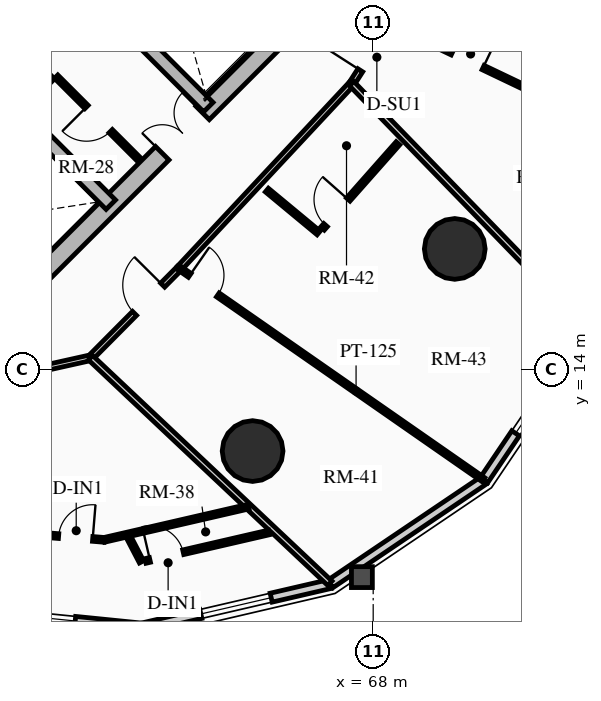
"""IFC4 building model, lengths in metres.
Left out: names, types, materials, properties, quantities, classifications, styles, units other than length and angle.
Written with IfcOpenShell. Run it as: python <this file> out.ifc"""

import sys

from ifc_helpers import new_model, si_unit, direction, frame, frame_2d, origin, origin_2d, place, context, subcontext, project, spatial, rectangle, circle, extrude, source, transform, mapped, element, fill, save


model = new_model("IFC4")
c1 = context("Model", 3, precision=1e-05, world=origin(), true_north=direction((0.0, 1.0)))
c2 = subcontext(c1, "Body", "Model", "MODEL_VIEW")
j1 = project(units=[si_unit("LENGTHUNIT", "METRE"), si_unit("PLANEANGLEUNIT", "RADIAN")], contexts=[c1])
p1 = place(None, origin())
s1 = spatial("IfcSite", under=j1, at=p1, CompositionType="ELEMENT")
p2 = place(p1, origin())
s2 = spatial("IfcBuilding", under=s1, at=p2, CompositionType="ELEMENT")
p3 = place(p2, frame((0.0, 0.0, 45.28)))
s3 = spatial("IfcBuildingStorey", under=s2, at=p3, CompositionType="ELEMENT", Elevation=45.28)
p4 = place(p3, frame((58.596, 15.838, 0.0), z_axis=(0.0, 0.0, 1.0), x_axis=(0.707106781187, 0.707106781187, 0.0)))
e1 = element("IfcWall", 1, at=p4, inside=s3, PredefinedType="SHEAR", context=c2, shape_type="SweptSolid", body=[
    extrude(rectangle(XDim=10.7, YDim=0.5, at=frame_2d((5.35, 0.0))), origin(), (0.0, 0.0, 1.0), 2.91),
])
m1 = source(origin(), c2, "Body", "SweptSolid", [
    extrude(rectangle(XDim=1.5, YDim=2.02, at=frame_2d((0.75, 1.01))), frame((0.0, 0.26, 0.0), z_axis=(0.0, -1.0, 0.0), x_axis=(1.0, 0.0, 0.0)), (0.0, 0.0, 1.0), 0.52),
])
p5 = place(p4, frame((5.45, 0.0, 0.0)))
e2 = element("IfcOpeningElement", 2, at=p5, cuts=e1, PredefinedType="OPENING", context=c2, shape_type="MappedRepresentation", body=[
    mapped(m1, transform((0.0, 0.0, 0.0), x_axis=(1.0, 0.0, 0.0), y_axis=(0.0, 1.0, 0.0), z_axis=(0.0, 0.0, 1.0), scale=1.0)),
])
p6 = place(p3, frame((61.096, 18.338, 0.0), z_axis=(0.0, 0.0, 1.0), x_axis=(-0.707106781187, 0.707106781187, 0.0)))
e3 = element("IfcWall", 3, at=p6, inside=s3, PredefinedType="SHEAR", context=c2, shape_type="SweptSolid", body=[
    extrude(rectangle(XDim=13.8, YDim=0.35, at=frame_2d((6.9, 0.0))), origin(), (0.0, 0.0, 1.0), 2.91),
])
m2 = source(origin(), c2, "Body", "SweptSolid", [
    extrude(rectangle(XDim=1.1, YDim=2.015, at=frame_2d((0.55, 1.007))), frame((0.0, 0.185, 0.0), z_axis=(0.0, -1.0, 0.0), x_axis=(1.0, 0.0, 0.0)), (0.0, 0.0, 1.0), 0.37),
])
p7 = place(p6, frame((4.9, 0.0, 0.0)))
e4 = element("IfcOpeningElement", 4, at=p7, cuts=e3, PredefinedType="OPENING", context=c2, shape_type="MappedRepresentation", body=[
    mapped(m2, transform((0.0, 0.0, 0.0), x_axis=(1.0, 0.0, 0.0), y_axis=(0.0, 1.0, 0.0), z_axis=(0.0, 0.0, 1.0), scale=1.0)),
])
m3 = source(origin(), c2, "Body", "SweptSolid", [
    extrude(rectangle(XDim=1.15, YDim=2.02, at=frame_2d((0.575, 1.01))), frame((0.0, 0.185, 0.0), z_axis=(0.0, -1.0, 0.0), x_axis=(1.0, 0.0, 0.0)), (0.0, 0.0, 1.0), 0.37),
])
p8 = place(p6, frame((7.32, 0.0, 0.0)))
e5 = element("IfcOpeningElement", 5, at=p8, cuts=e3, PredefinedType="OPENING", context=c2, shape_type="MappedRepresentation", body=[
    mapped(m3, transform((0.0, 0.0, 0.0), x_axis=(1.0, 0.0, 0.0), y_axis=(0.0, 1.0, 0.0), z_axis=(0.0, 0.0, 1.0), scale=1.0)),
])
p9 = place(p3, frame((63.662, 20.904, 0.0), z_axis=(0.0, 0.0, 1.0), x_axis=(-0.707106781187, 0.707106781187, 0.0)))
e6 = element("IfcWall", 6, at=p9, inside=s3, PredefinedType="SHEAR", context=c2, shape_type="SweptSolid", body=[
    extrude(rectangle(XDim=13.8, YDim=0.35, at=frame_2d((6.9, 0.0))), origin(), (0.0, 0.0, 1.0), 2.91),
])
p10 = place(p9, frame((10.025, 0.0, 0.0)))
e7 = element("IfcOpeningElement", 7, at=p10, cuts=e6, PredefinedType="OPENING", context=c2, shape_type="MappedRepresentation", body=[
    mapped(m2, transform((0.0, 0.0, 0.0), x_axis=(1.0, 0.0, 0.0), y_axis=(0.0, 1.0, 0.0), z_axis=(0.0, 0.0, 1.0), scale=1.0)),
])
p11 = place(p9, frame((12.025, 0.0, 0.0)))
e8 = element("IfcOpeningElement", 8, at=p11, cuts=e6, PredefinedType="OPENING", context=c2, shape_type="MappedRepresentation", body=[
    mapped(m2, transform((0.0, 0.0, 0.0), x_axis=(1.0, 0.0, 0.0), y_axis=(0.0, 1.0, 0.0), z_axis=(0.0, 0.0, 1.0), scale=1.0)),
])
p12 = place(p9, frame((5.33, 0.0, 0.0)))
e9 = element("IfcOpeningElement", 9, at=p12, cuts=e6, PredefinedType="OPENING", context=c2, shape_type="MappedRepresentation", body=[
    mapped(m3, transform((0.0, 0.0, 0.0), x_axis=(1.0, 0.0, 0.0), y_axis=(0.0, 1.0, 0.0), z_axis=(0.0, 0.0, 1.0), scale=1.0)),
])
for number, where, z_axis, x_axis in (
    (10, (64.827, 11.854, 0.0), (0.0, 0.0, 1.0), (1.0, 0.0, 0.0)),
    (11, (70.146, 17.173, 0.0), (0.0, 0.0, 1.0), (1.0, 0.0, 0.0)),
):
    element("IfcColumn", number, at=place(p3, frame(where, z_axis=z_axis, x_axis=x_axis)), inside=s3, PredefinedType="USERDEFINED", context=c2, shape_type="SweptSolid", body=[
        extrude(circle(Radius=0.8, at=origin_2d()), origin(), (0.0, 0.0, 1.0), 2.91),
    ])
p13 = place(p3, frame((61.91, 7.206, 0.0), z_axis=(0.0, 0.0, 1.0), x_axis=(-0.994968263437, 0.100190592135, 0.0)))
e12 = element("IfcWall", 12, at=p13, inside=s3, PredefinedType="SOLIDWALL", context=c2, shape_type="SweptSolid", body=[
    extrude(rectangle(XDim=5.419, YDim=0.24, at=frame_2d((2.71, 0.0))), origin(), (0.0, 0.0, 1.0), 2.073),
])
m4 = source(origin(), c2, "Body", "SweptSolid", [
    extrude(rectangle(XDim=1.9, YDim=1.35, at=frame_2d((0.95, 0.675))), frame((0.0, 0.13, 0.0), z_axis=(0.0, -1.0, 0.0), x_axis=(1.0, 0.0, 0.0)), (0.0, 0.0, 1.0), 0.26),
])
p14 = place(p13, frame((1.76, 0.0, 0.65)))
e13 = element("IfcOpeningElement", 13, at=p14, cuts=e12, PredefinedType="OPENING", context=c2, shape_type="MappedRepresentation", body=[
    mapped(m4, transform((0.0, 0.0, 0.0), x_axis=(1.0, 0.0, 0.0), y_axis=(0.0, 1.0, 0.0), z_axis=(0.0, 0.0, 1.0), scale=1.0)),
])
p15 = place(p3, frame((66.871, 8.356, 0.0), z_axis=(0.0, 0.0, 1.0), x_axis=(-0.974167686491, -0.22582585901, 0.0)))
e14 = element("IfcWall", 14, at=p15, inside=s3, PredefinedType="SOLIDWALL", context=c2, shape_type="SweptSolid", body=[
    extrude(rectangle(XDim=5.092, YDim=0.24, at=frame_2d((2.546, 0.0))), origin(), (0.0, 0.0, 1.0), 2.073),
])
p16 = place(p15, frame((1.596, 0.0, 0.65)))
e15 = element("IfcOpeningElement", 15, at=p16, cuts=e14, PredefinedType="OPENING", context=c2, shape_type="MappedRepresentation", body=[
    mapped(m4, transform((0.0, 0.0, 0.0), x_axis=(1.0, 0.0, 0.0), y_axis=(0.0, 1.0, 0.0), z_axis=(0.0, 0.0, 1.0), scale=1.0)),
])
p17 = place(p3, frame((70.914, 11.086, 0.0), z_axis=(0.0, 0.0, 1.0), x_axis=(-0.828748297084, -0.559621532896, 0.0)))
e16 = element("IfcWall", 16, at=p17, inside=s3, PredefinedType="SOLIDWALL", context=c2, shape_type="SweptSolid", body=[
    extrude(rectangle(XDim=4.879, YDim=0.24, at=frame_2d((2.439, 0.0))), origin(), (0.0, 0.0, 1.0), 2.073),
])
p18 = place(p3, frame((73.644, 15.129, 0.0), z_axis=(0.0, 0.0, 1.0), x_axis=(-0.559621532896, -0.828748297084, 0.0)))
e17 = element("IfcWall", 17, at=p18, inside=s3, PredefinedType="SOLIDWALL", context=c2, shape_type="SweptSolid", body=[
    extrude(rectangle(XDim=4.879, YDim=0.24, at=frame_2d((2.439, 0.0))), origin(), (0.0, 0.0, 1.0), 2.073),
])
p19 = place(p18, frame((1.489, 0.0, 0.65)))
e18 = element("IfcOpeningElement", 18, at=p19, cuts=e17, PredefinedType="OPENING", context=c2, shape_type="MappedRepresentation", body=[
    mapped(m4, transform((0.0, 0.0, 0.0), x_axis=(1.0, 0.0, 0.0), y_axis=(0.0, 1.0, 0.0), z_axis=(0.0, 0.0, 1.0), scale=1.0)),
])
p20 = place(p3, frame((58.214, 21.467, 0.0), z_axis=(0.0, 0.0, 1.0), x_axis=(0.707106781187, 0.707106781187, 0.0)))
e19 = element("IfcWall", 19, at=p20, inside=s3, PredefinedType="PARTITIONING", context=c2, shape_type="SweptSolid", body=[
    extrude(rectangle(XDim=3.28, YDim=0.2, at=frame_2d((1.64, 0.0))), origin(), (0.0, 0.0, 1.0), 2.635),
])
m5 = source(origin(), c2, "Body", "SweptSolid", [
    extrude(rectangle(XDim=1.5, YDim=2.02, at=frame_2d((0.75, 1.01))), frame((0.0, 0.11, 0.0), z_axis=(0.0, -1.0, 0.0), x_axis=(1.0, 0.0, 0.0)), (0.0, 0.0, 1.0), 0.22),
])
p21 = place(p20, frame((1.55, 0.0, 0.0)))
e20 = element("IfcOpeningElement", 20, at=p21, cuts=e19, PredefinedType="OPENING", context=c2, shape_type="MappedRepresentation", body=[
    mapped(m5, transform((0.0, 0.0, 0.0), x_axis=(1.0, 0.0, 0.0), y_axis=(0.0, 1.0, 0.0), z_axis=(0.0, 0.0, 1.0), scale=1.0)),
])
p22 = place(p3, frame((61.835, 19.529, 0.0), z_axis=(0.0, 0.0, 1.0), x_axis=(-0.707146413884, 0.707067146267, 0.0)))
e21 = element("IfcWall", 21, at=p22, inside=s3, PredefinedType="PARTITIONING", context=c2, shape_type="SweptSolid", body=[
    extrude(rectangle(XDim=3.08, YDim=0.125, at=frame_2d((1.54, 0.0))), origin(), (0.0, 0.0, 1.0), 2.635),
])
m6 = source(origin(), c2, "Body", "SweptSolid", [
    extrude(rectangle(XDim=0.9, YDim=2.005, at=frame_2d((0.45, 1.002))), frame((0.0, 0.073, 0.0), z_axis=(0.0, -1.0, 0.0), x_axis=(1.0, 0.0, 0.0)), (0.0, 0.0, 1.0), 0.145),
])
p23 = place(p22, frame((1.05, 0.0, 0.0)))
e22 = element("IfcOpeningElement", 22, at=p23, cuts=e21, PredefinedType="OPENING", context=c2, shape_type="MappedRepresentation", body=[
    mapped(m6, transform((0.0, 0.0, 0.0), x_axis=(1.0, 0.0, 0.0), y_axis=(0.0, 1.0, 0.0), z_axis=(0.0, 0.0, 1.0), scale=1.0)),
])
p24 = place(p3, frame((58.794, 20.915, 0.0), z_axis=(0.0, 0.0, 1.0), x_axis=(0.707106781187, 0.707106781187, 0.0)))
e23 = element("IfcWall", 23, at=p24, inside=s3, PredefinedType="PARTITIONING", context=c2, shape_type="SweptSolid", body=[
    extrude(rectangle(XDim=1.1, YDim=0.125, at=frame_2d((0.55, 0.0))), origin(), (0.0, 0.0, 1.0), 2.635),
])
p25 = place(p3, frame((59.008, 13.963, 0.0), z_axis=(0.0, 0.0, 1.0), x_axis=(0.976020856791, 0.21767702476, 0.0)))
e24 = element("IfcWall", 24, at=p25, inside=s3, PredefinedType="PARTITIONING", context=c2, shape_type="SweptSolid", body=[
    extrude(rectangle(XDim=1.593, YDim=0.15, at=frame_2d((0.796, 0.0))), origin(), (0.0, 0.0, 1.0), 2.205),
])
p26 = place(p3, frame((60.562, 14.31, 0.0), z_axis=(0.0, 0.0, 1.0), x_axis=(0.704566236161, 0.709638230975, 0.0)))
e25 = element("IfcWall", 25, at=p26, inside=s3, PredefinedType="PARTITIONING", context=c2, shape_type="SweptSolid", body=[
    extrude(rectangle(XDim=3.321, YDim=0.15, at=frame_2d((1.661, 0.0))), origin(), (0.0, 0.0, 1.0), 2.159),
])
m7 = source(origin(), c2, "Body", "SweptSolid", [
    extrude(rectangle(XDim=1.05, YDim=2.015, at=frame_2d((0.525, 1.007))), frame((0.0, 0.085, 0.0), z_axis=(0.0, -1.0, 0.0), x_axis=(1.0, 0.0, 0.0)), (0.0, 0.0, 1.0), 0.17),
])
p27 = place(p26, frame((1.643, 0.0, 0.0)))
e26 = element("IfcOpeningElement", 26, at=p27, cuts=e25, PredefinedType="OPENING", context=c2, shape_type="MappedRepresentation", body=[
    mapped(m7, transform((0.0, 0.0, 0.0), x_axis=(1.0, 0.0, 0.0), y_axis=(0.0, 1.0, 0.0), z_axis=(0.0, 0.0, 1.0), scale=1.0)),
])
p28 = place(p3, frame((62.903, 16.667, 0.0), z_axis=(0.0, 0.0, 1.0), x_axis=(0.682371947497, 0.731005147225, 0.0)))
e27 = element("IfcWall", 27, at=p28, inside=s3, PredefinedType="PARTITIONING", context=c2, shape_type="SweptSolid", body=[
    extrude(rectangle(XDim=6.642, YDim=0.15, at=frame_2d((3.321, 0.0))), origin(), (0.0, 0.0, 1.0), 2.159),
])
p29 = place(p3, frame((67.435, 21.521, 0.0), z_axis=(0.0, 0.0, 1.0), x_axis=(0.540777197838, 0.841165870859, 0.0)))
e28 = element("IfcWall", 28, at=p29, inside=s3, PredefinedType="PARTITIONING", context=c2, shape_type="SweptSolid", body=[
    extrude(rectangle(XDim=1.888, YDim=0.15, at=frame_2d((0.944, 0.0))), origin(), (0.0, 0.0, 1.0), 2.205),
])
p30 = place(p29, frame((0.419, 0.0, 0.0)))
e29 = element("IfcOpeningElement", 29, at=p30, cuts=e28, PredefinedType="OPENING", context=c2, shape_type="MappedRepresentation", body=[
    mapped(m7, transform((0.0, 0.0, 0.0), x_axis=(1.0, 0.0, 0.0), y_axis=(0.0, 1.0, 0.0), z_axis=(0.0, 0.0, 1.0), scale=1.0)),
])
p31 = place(p3, frame((60.562, 14.31, 0.0), z_axis=(0.0, 0.0, 1.0), x_axis=(0.727781661561, -0.685808904211, 0.0)))
e30 = element("IfcWall", 30, at=p31, inside=s3, PredefinedType="PARTITIONING", context=c2, shape_type="SweptSolid", body=[
    extrude(rectangle(XDim=8.655, YDim=0.16, at=frame_2d((4.328, 0.0))), origin(), (0.0, 0.0, 1.0), 2.073),
])
p32 = place(p3, frame((67.435, 21.521, 0.0), z_axis=(0.0, 0.0, 1.0), x_axis=(0.6962628802, -0.717786877601, 0.0)))
e31 = element("IfcWall", 31, at=p32, inside=s3, PredefinedType="PARTITIONING", context=c2, shape_type="SweptSolid", body=[
    extrude(rectangle(XDim=8.893, YDim=0.16, at=frame_2d((4.446, 0.0))), origin(), (0.0, 0.0, 1.0), 2.073),
])
p33 = place(p3, frame((56.858, 9.852, 0.0), z_axis=(0.0, 0.0, 1.0), x_axis=(0.996604967548, -0.082331881181, 0.0)))
e32 = element("IfcWall", 32, at=p33, inside=s3, PredefinedType="PARTITIONING", context=c2, shape_type="SweptSolid", body=[
    extrude(rectangle(XDim=4.077, YDim=0.125, at=frame_2d((2.039, 0.0))), origin(), (0.0, 0.0, 1.0), 2.205),
])
p34 = place(p33, frame((2.874, 0.0, 0.0)))
e33 = element("IfcOpeningElement", 33, at=p34, cuts=e32, PredefinedType="OPENING", context=c2, shape_type="MappedRepresentation", body=[
    mapped(m6, transform((0.0, 0.0, 0.0), x_axis=(1.0, 0.0, 0.0), y_axis=(0.0, 1.0, 0.0), z_axis=(0.0, 0.0, 1.0), scale=1.0)),
])
p35 = place(p3, frame((60.921, 9.517, 0.0), z_axis=(0.0, 0.0, 1.0), x_axis=(0.974453436038, 0.224589627973, 0.0)))
e34 = element("IfcWall", 34, at=p35, inside=s3, PredefinedType="PARTITIONING", context=c2, shape_type="SweptSolid", body=[
    extrude(rectangle(XDim=3.898, YDim=0.125, at=frame_2d((1.949, 0.0))), origin(), (0.0, 0.0, 1.0), 2.205),
])
p36 = place(p3, frame((61.564, 9.589, 0.0), z_axis=(0.0, 0.0, 1.0), x_axis=(0.462168536246, -0.886792108729, 0.0)))
e35 = element("IfcWall", 35, at=p36, inside=s3, PredefinedType="PARTITIONING", context=c2, shape_type="SweptSolid", body=[
    extrude(rectangle(XDim=0.735, YDim=0.125, at=frame_2d((0.367, 0.0))), origin(), (0.0, 0.0, 1.0), 2.635),
])
p37 = place(p3, frame((62.008, 8.962, 0.0), z_axis=(0.0, 0.0, 1.0), x_axis=(0.974365294983, 0.224971713626, 0.0)))
e36 = element("IfcWall", 36, at=p37, inside=s3, PredefinedType="PARTITIONING", context=c2, shape_type="SweptSolid", body=[
    extrude(rectangle(XDim=3.337, YDim=0.125, at=frame_2d((1.668, 0.0))), origin(), (0.0, 0.0, 1.0), 2.635),
])
p38 = place(p37, frame((0.12, 0.0, 0.0)))
e37 = element("IfcOpeningElement", 37, at=p38, cuts=e36, PredefinedType="OPENING", context=c2, shape_type="MappedRepresentation", body=[
    mapped(m6, transform((0.0, 0.0, 0.0), x_axis=(1.0, 0.0, 0.0), y_axis=(0.0, 1.0, 0.0), z_axis=(0.0, 0.0, 1.0), scale=1.0)),
])
p39 = place(p3, frame((62.903, 16.667, 0.0), z_axis=(0.0, 0.0, 1.0), x_axis=(0.820761665638, -0.571270766116, 0.0)))
e38 = element("IfcWall", 38, at=p39, inside=s3, PredefinedType="PARTITIONING", context=c2, shape_type="SweptSolid", body=[
    extrude(rectangle(XDim=9.743, YDim=0.125, at=frame_2d((4.872, 0.0))), origin(), (0.0, 0.0, 1.0), 2.073),
])
p40 = place(p39, frame((0.33, 0.0, 0.0)))
e39 = element("IfcOpeningElement", 39, at=p40, cuts=e38, PredefinedType="OPENING", context=c2, shape_type="MappedRepresentation", body=[
    mapped(m6, transform((0.0, 0.0, 0.0), x_axis=(1.0, 0.0, 0.0), y_axis=(0.0, 1.0, 0.0), z_axis=(0.0, 0.0, 1.0), scale=1.0)),
])
p41 = place(p3, frame((65.202, 18.721, 0.0), z_axis=(0.0, 0.0, 1.0), x_axis=(0.769814202386, -0.638268042287, 0.0)))
e40 = element("IfcWall", 40, at=p41, inside=s3, PredefinedType="PARTITIONING", context=c2, shape_type="SweptSolid", body=[
    extrude(rectangle(XDim=1.769, YDim=0.125, at=frame_2d((0.884, 0.0))), origin(), (0.0, 0.0, 1.0), 2.635),
])
p42 = place(p3, frame((66.667, 17.709, 0.0), z_axis=(0.0, 0.0, 1.0), x_axis=(0.662510581678, 0.749052554341, 0.0)))
e41 = element("IfcWall", 41, at=p42, inside=s3, PredefinedType="PARTITIONING", context=c2, shape_type="SweptSolid", body=[
    extrude(rectangle(XDim=2.996, YDim=0.125, at=frame_2d((1.498, 0.0))), origin(), (0.0, 0.0, 1.0), 2.159),
])
p43 = place(p42, frame((0.12, 0.0, 0.0)))
e42 = element("IfcOpeningElement", 42, at=p43, cuts=e41, PredefinedType="OPENING", context=c2, shape_type="MappedRepresentation", body=[
    mapped(m6, transform((0.0, 0.0, 0.0), x_axis=(1.0, 0.0, 0.0), y_axis=(0.0, 1.0, 0.0), z_axis=(0.0, 0.0, 1.0), scale=1.0)),
])
p44 = place(p3, frame((68.456, 23.11, 0.0), z_axis=(0.0, 0.0, 1.0), x_axis=(0.902430819297, -0.430834790125, 0.0)))
e43 = element("IfcWall", 43, at=p44, inside=s3, PredefinedType="PARTITIONING", context=c2, shape_type="SweptSolid", body=[
    extrude(rectangle(XDim=7.002, YDim=0.125, at=frame_2d((3.501, 0.0))), origin(), (0.0, 0.0, 1.0), 2.073),
])
p45 = place(p44, frame((1.8, 0.0, 0.0)))
e44 = element("IfcOpeningElement", 44, at=p45, cuts=e43, PredefinedType="OPENING", context=c2, shape_type="MappedRepresentation", body=[
    mapped(m6, transform((0.0, 0.0, 0.0), x_axis=(1.0, 0.0, 0.0), y_axis=(0.0, 1.0, 0.0), z_axis=(0.0, 0.0, 1.0), scale=1.0)),
])
m8 = source(origin(), c2, "Body", "SweptSolid", [
    extrude(rectangle(XDim=1.9, YDim=1.35, at=frame_2d((0.95, 0.675))), frame((0.0, 0.03, 0.0), z_axis=(0.0, -1.0, 0.0), x_axis=(1.0, 0.0, 0.0)), (0.0, 0.0, 1.0), 0.06),
])
p46 = place(p14, origin())
e45 = element("IfcWindow", 45, at=p46, inside=s3, PartitioningType="DOUBLE_PANEL_VERTICAL", PredefinedType="WINDOW", context=c2, shape_type="MappedRepresentation", body=[
    mapped(m8, transform((0.0, 0.0, 0.0), x_axis=(1.0, 0.0, 0.0), y_axis=(0.0, 1.0, 0.0), z_axis=(0.0, 0.0, 1.0), scale=1.0)),
])
fill(e13, e45)
p47 = place(p16, origin())
e46 = element("IfcWindow", 46, at=p47, inside=s3, PartitioningType="DOUBLE_PANEL_VERTICAL", PredefinedType="WINDOW", context=c2, shape_type="MappedRepresentation", body=[
    mapped(m8, transform((0.0, 0.0, 0.0), x_axis=(1.0, 0.0, 0.0), y_axis=(0.0, 1.0, 0.0), z_axis=(0.0, 0.0, 1.0), scale=1.0)),
])
fill(e15, e46)
p48 = place(p19, origin())
e47 = element("IfcWindow", 47, at=p48, inside=s3, PartitioningType="DOUBLE_PANEL_VERTICAL", PredefinedType="WINDOW", context=c2, shape_type="MappedRepresentation", body=[
    mapped(m8, transform((0.0, 0.0, 0.0), x_axis=(1.0, 0.0, 0.0), y_axis=(0.0, 1.0, 0.0), z_axis=(0.0, 0.0, 1.0), scale=1.0)),
])
fill(e18, e47)
m9 = source(origin(), c2, "Body", "SweptSolid", [
    extrude(rectangle(XDim=1.5, YDim=2.02, at=frame_2d((0.75, 1.01))), frame((0.0, 0.025, 0.0), z_axis=(0.0, -1.0, 0.0), x_axis=(1.0, 0.0, 0.0)), (0.0, 0.0, 1.0), 0.05),
])
p49 = place(p5, origin())
e48 = element("IfcDoor", 48, at=p49, inside=s3, OperationType="DOUBLE_DOOR_SINGLE_SWING", PredefinedType="DOOR", context=c2, shape_type="MappedRepresentation", body=[
    mapped(m9, transform((0.0, 0.0, 0.0), x_axis=(1.0, 0.0, 0.0), y_axis=(0.0, 1.0, 0.0), z_axis=(0.0, 0.0, 1.0), scale=1.0)),
])
fill(e2, e48)
m10 = source(origin(), c2, "Body", "SweptSolid", [
    extrude(rectangle(XDim=0.9, YDim=2.005, at=frame_2d((0.45, 1.002))), frame((0.0, 0.025, 0.0), z_axis=(0.0, -1.0, 0.0), x_axis=(1.0, 0.0, 0.0)), (0.0, 0.0, 1.0), 0.05),
])
p50 = place(p23, origin())
e49 = element("IfcDoor", 49, at=p50, inside=s3, OperationType="SINGLE_SWING_RIGHT", PredefinedType="DOOR", context=c2, shape_type="MappedRepresentation", body=[
    mapped(m10, transform((0.0, 0.0, 0.0), x_axis=(1.0, 0.0, 0.0), y_axis=(0.0, 1.0, 0.0), z_axis=(0.0, 0.0, 1.0), scale=1.0)),
])
fill(e22, e49)
p51 = place(p34, origin())
e50 = element("IfcDoor", 50, at=p51, inside=s3, OperationType="SINGLE_SWING_RIGHT", PredefinedType="DOOR", context=c2, shape_type="MappedRepresentation", body=[
    mapped(m10, transform((0.0, 0.0, 0.0), x_axis=(1.0, 0.0, 0.0), y_axis=(0.0, 1.0, 0.0), z_axis=(0.0, 0.0, 1.0), scale=1.0)),
])
fill(e33, e50)
p52 = place(p38, origin())
e51 = element("IfcDoor", 51, at=p52, inside=s3, OperationType="SINGLE_SWING_LEFT", PredefinedType="DOOR", context=c2, shape_type="MappedRepresentation", body=[
    mapped(m10, transform((0.0, 0.0, 0.0), x_axis=(1.0, 0.0, 0.0), y_axis=(0.0, 1.0, 0.0), z_axis=(0.0, 0.0, 1.0), scale=1.0)),
])
fill(e37, e51)
m11 = source(origin(), c2, "Body", "SweptSolid", [
    extrude(rectangle(XDim=1.05, YDim=2.015, at=frame_2d((0.525, 1.007))), frame((0.0, 0.025, 0.0), z_axis=(0.0, -1.0, 0.0), x_axis=(1.0, 0.0, 0.0)), (0.0, 0.0, 1.0), 0.05),
])
p53 = place(p27, origin())
e52 = element("IfcDoor", 52, at=p53, inside=s3, OperationType="SINGLE_SWING_RIGHT", PredefinedType="DOOR", context=c2, shape_type="MappedRepresentation", body=[
    mapped(m11, transform((0.0, 0.0, 0.0), x_axis=(1.0, 0.0, 0.0), y_axis=(0.0, 1.0, 0.0), z_axis=(0.0, 0.0, 1.0), scale=1.0)),
])
fill(e26, e52)
p54 = place(p40, origin())
e53 = element("IfcDoor", 53, at=p54, inside=s3, OperationType="SINGLE_SWING_LEFT", PredefinedType="DOOR", context=c2, shape_type="MappedRepresentation", body=[
    mapped(m10, transform((0.0, 0.0, 0.0), x_axis=(1.0, 0.0, 0.0), y_axis=(0.0, 1.0, 0.0), z_axis=(0.0, 0.0, 1.0), scale=1.0)),
])
fill(e39, e53)
p55 = place(p43, origin())
e54 = element("IfcDoor", 54, at=p55, inside=s3, OperationType="SINGLE_SWING_RIGHT", PredefinedType="DOOR", context=c2, shape_type="MappedRepresentation", body=[
    mapped(m10, transform((0.0, 0.0, 0.0), x_axis=(1.0, 0.0, 0.0), y_axis=(0.0, 1.0, 0.0), z_axis=(0.0, 0.0, 1.0), scale=1.0)),
])
fill(e42, e54)
p56 = place(p30, origin())
e55 = element("IfcDoor", 55, at=p56, inside=s3, OperationType="SINGLE_SWING_LEFT", PredefinedType="DOOR", context=c2, shape_type="MappedRepresentation", body=[
    mapped(m11, transform((0.0, 0.0, 0.0), x_axis=(1.0, 0.0, 0.0), y_axis=(0.0, 1.0, 0.0), z_axis=(0.0, 0.0, 1.0), scale=1.0)),
])
fill(e29, e55)
p57 = place(p45, origin())
e56 = element("IfcDoor", 56, at=p57, inside=s3, OperationType="SINGLE_SWING_RIGHT", PredefinedType="DOOR", context=c2, shape_type="MappedRepresentation", body=[
    mapped(m10, transform((0.0, 0.0, 0.0), x_axis=(1.0, 0.0, 0.0), y_axis=(0.0, 1.0, 0.0), z_axis=(0.0, 0.0, 1.0), scale=1.0)),
])
fill(e44, e56)
save(model, sys.argv[1])
